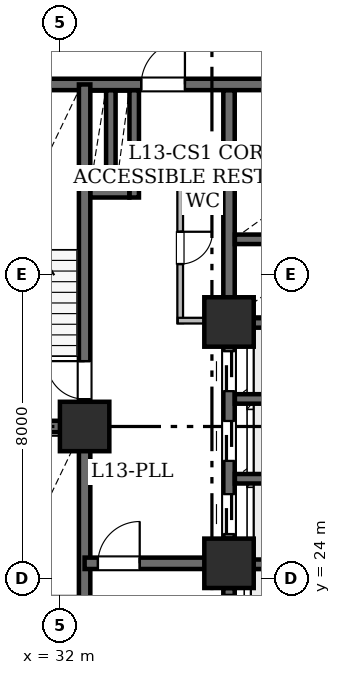
"""IFC4 building model, lengths in metres.
Left out: names, types, materials, properties, quantities, classifications, styles, units other than length and angle.
Written with IfcOpenShell. Run it as: python <this file> out.ifc"""

import sys

from ifc_helpers import new_model, si_unit, direction, frame, frame_2d, origin, origin_2d, place, context, subcontext, project, spatial, rectangle, hollow_rectangle, extrude, element, fill, save


model = new_model("IFC4")
c1 = context("Model", 3, precision=1e-05, world=origin(), true_north=direction((0.0, 1.0)))
c2 = subcontext(c1, "Body", "Model", "MODEL_VIEW")
j1 = project(units=[si_unit("LENGTHUNIT", "METRE"), si_unit("PLANEANGLEUNIT", "RADIAN")], contexts=[c1])
p1 = place(None, origin())
s1 = spatial("IfcSite", under=j1, at=p1, CompositionType="ELEMENT")
p2 = place(p1, origin())
s2 = spatial("IfcBuilding", under=s1, at=p2, CompositionType="ELEMENT")
p3 = place(p2, frame((0.0, 0.0, 55.2)))
s3 = spatial("IfcBuildingStorey", under=s2, at=p3, CompositionType="ELEMENT", Elevation=55.2)
for number, where, z_axis, x_axis in (
    (1, (32.65, 28.0, 0.0), (0.0, 0.0, 1.0), (1.0, 0.0, 0.0)),
    (2, (36.45, 24.4, 0.0), (0.0, 0.0, 1.0), (1.0, 0.0, 0.0)),
    (3, (36.45, 30.75, 0.0), (0.0, 0.0, 1.0), (1.0, 0.0, 0.0)),
):
    element("IfcColumn", number, at=place(p3, frame(where, z_axis=z_axis, x_axis=x_axis)), inside=s3, PredefinedType="COLUMN", context=c2, shape_type="SweptSolid", body=[
        extrude(hollow_rectangle(XDim=1.3, YDim=1.3, WallThickness=0.065, at=origin_2d()), origin(), (0.0, 0.0, 1.0), 3.65),
    ])
p4 = place(p3, frame((29.0, 37.0, 0.0), z_axis=(0.0, 0.0, 1.0), x_axis=(1.0, 0.0, 0.0)))
e4 = element("IfcWall", 4, at=p4, inside=s3, PredefinedType="SHEAR", context=c2, shape_type="SweptSolid", body=[
    extrude(rectangle(XDim=10.4, YDim=0.3, at=frame_2d((5.2, 0.0))), origin(), (0.0, 0.0, 1.0), 3.43),
])
p5 = place(p4, frame((5.14, 0.0, 0.0)))
e5 = element("IfcOpeningElement", 5, at=p5, cuts=e4, PredefinedType="OPENING", context=c2, shape_type="SweptSolid", body=[
    extrude(rectangle(XDim=1.15, YDim=2.2, at=frame_2d((0.575, 1.1))), frame((0.0, 0.16, 0.0), z_axis=(0.0, -1.0, 0.0), x_axis=(1.0, 0.0, 0.0)), (0.0, 0.0, 1.0), 0.32),
])
p6 = place(p3, frame((32.65, 19.0, 0.0), z_axis=(0.0, 0.0, 1.0), x_axis=(0.0, 1.0, 0.0)))
e6 = element("IfcWall", 6, at=p6, inside=s3, PredefinedType="SHEAR", context=c2, shape_type="SweptSolid", body=[
    extrude(rectangle(XDim=9.0, YDim=0.3, at=frame_2d((4.5, 0.0))), origin(), (0.0, 0.0, 1.0), 3.43),
])
p7 = place(p6, frame((0.72, 0.0, 0.0)))
e7 = element("IfcOpeningElement", 7, at=p7, cuts=e6, PredefinedType="OPENING", context=c2, shape_type="SweptSolid", body=[
    extrude(rectangle(XDim=1.0, YDim=2.15, at=frame_2d((0.5, 1.075))), frame((0.0, 0.16, 0.0), z_axis=(0.0, -1.0, 0.0), x_axis=(1.0, 0.0, 0.0)), (0.0, 0.0, 1.0), 0.32),
])
p8 = place(p3, frame((32.65, 28.0, 0.0), z_axis=(0.0, 0.0, 1.0), x_axis=(0.0, 1.0, 0.0)))
e8 = element("IfcWall", 8, at=p8, inside=s3, PredefinedType="SHEAR", context=c2, shape_type="SweptSolid", body=[
    extrude(rectangle(XDim=9.0, YDim=0.3, at=frame_2d((4.5, 0.0))), origin(), (0.0, 0.0, 1.0), 3.43),
])
p9 = place(p8, frame((0.72, 0.0, 0.0)))
e9 = element("IfcOpeningElement", 9, at=p9, cuts=e8, PredefinedType="OPENING", context=c2, shape_type="SweptSolid", body=[
    extrude(rectangle(XDim=1.0, YDim=2.15, at=frame_2d((0.5, 1.075))), frame((0.0, 0.16, 0.0), z_axis=(0.0, -1.0, 0.0), x_axis=(1.0, 0.0, 0.0)), (0.0, 0.0, 1.0), 0.32),
])
p10 = place(p3, frame((29.0, 28.0, 0.0), z_axis=(0.0, 0.0, 1.0), x_axis=(1.0, 0.0, 0.0)))
e10 = element("IfcWall", 10, at=p10, inside=s3, PredefinedType="SHEAR", context=c2, shape_type="SweptSolid", body=[
    extrude(rectangle(XDim=3.65, YDim=0.3, at=frame_2d((1.825, 0.0))), origin(), (0.0, 0.0, 1.0), 3.43),
])
p11 = place(p3, frame((32.65, 24.4, 0.0), z_axis=(0.0, 0.0, 1.0), x_axis=(1.0, 0.0, 0.0)))
e11 = element("IfcWall", 11, at=p11, inside=s3, PredefinedType="SHEAR", context=c2, shape_type="SweptSolid", body=[
    extrude(rectangle(XDim=3.8, YDim=0.3, at=frame_2d((1.9, 0.0))), origin(), (0.0, 0.0, 1.0), 3.43),
])
p12 = place(p11, frame((0.35, 0.0, 0.0)))
e12 = element("IfcOpeningElement", 12, at=p12, cuts=e11, PredefinedType="OPENING", context=c2, shape_type="SweptSolid", body=[
    extrude(rectangle(XDim=1.1, YDim=2.15, at=frame_2d((0.55, 1.075))), frame((0.0, 0.16, 0.0), z_axis=(0.0, -1.0, 0.0), x_axis=(1.0, 0.0, 0.0)), (0.0, 0.0, 1.0), 0.32),
])
p13 = place(p3, frame((36.45, 19.154, 0.0), z_axis=(0.0, 0.0, 1.0), x_axis=(0.0, 1.0, 0.0)))
e13 = element("IfcWall", 13, at=p13, inside=s3, PredefinedType="SHEAR", context=c2, shape_type="SweptSolid", body=[
    extrude(rectangle(XDim=4.596, YDim=0.3, at=frame_2d((2.298, 0.0))), origin(), (0.0, 0.0, 1.0), 3.43),
])
p14 = place(p13, frame((0.696, 0.0, 0.0)))
e14 = element("IfcOpeningElement", 14, at=p14, cuts=e13, PredefinedType="OPENING", context=c2, shape_type="SweptSolid", body=[
    extrude(rectangle(XDim=1.1, YDim=2.15, at=frame_2d((0.55, 1.075))), frame((0.0, 0.16, 0.0), z_axis=(0.0, -1.0, 0.0), x_axis=(1.0, 0.0, 0.0)), (0.0, 0.0, 1.0), 0.32),
])
p15 = place(p13, frame((3.316, 0.0, 0.0)))
e15 = element("IfcOpeningElement", 15, at=p15, cuts=e13, PredefinedType="OPENING", context=c2, shape_type="SweptSolid", body=[
    extrude(rectangle(XDim=1.1, YDim=2.15, at=frame_2d((0.55, 1.075))), frame((0.0, 0.16, 0.0), z_axis=(0.0, -1.0, 0.0), x_axis=(1.0, 0.0, 0.0)), (0.0, 0.0, 1.0), 0.32),
])
p16 = place(p3, frame((36.45, 25.05, 0.0), z_axis=(0.0, 0.0, 1.0), x_axis=(0.0, 1.0, 0.0)))
e16 = element("IfcWall", 16, at=p16, inside=s3, PredefinedType="SHEAR", context=c2, shape_type="SweptSolid", body=[
    extrude(rectangle(XDim=5.05, YDim=0.3, at=frame_2d((2.525, 0.0))), origin(), (0.0, 0.0, 1.0), 3.43),
])
p17 = place(p16, frame((0.12, 0.0, 0.0)))
e17 = element("IfcOpeningElement", 17, at=p17, cuts=e16, PredefinedType="OPENING", context=c2, shape_type="SweptSolid", body=[
    extrude(rectangle(XDim=1.05, YDim=2.15, at=frame_2d((0.525, 1.075))), frame((0.0, 0.16, 0.0), z_axis=(0.0, -1.0, 0.0), x_axis=(1.0, 0.0, 0.0)), (0.0, 0.0, 1.0), 0.32),
])
p18 = place(p16, frame((2.045, 0.0, 0.0)))
e18 = element("IfcOpeningElement", 18, at=p18, cuts=e16, PredefinedType="OPENING", context=c2, shape_type="SweptSolid", body=[
    extrude(rectangle(XDim=1.05, YDim=2.15, at=frame_2d((0.525, 1.075))), frame((0.0, 0.16, 0.0), z_axis=(0.0, -1.0, 0.0), x_axis=(1.0, 0.0, 0.0)), (0.0, 0.0, 1.0), 0.32),
])
p19 = place(p16, frame((3.88, 0.0, 0.0)))
e19 = element("IfcOpeningElement", 19, at=p19, cuts=e16, PredefinedType="OPENING", context=c2, shape_type="SweptSolid", body=[
    extrude(rectangle(XDim=1.05, YDim=2.15, at=frame_2d((0.525, 1.075))), frame((0.0, 0.16, 0.0), z_axis=(0.0, -1.0, 0.0), x_axis=(1.0, 0.0, 0.0)), (0.0, 0.0, 1.0), 0.32),
])
p20 = place(p3, frame((36.45, 31.4, 0.0), z_axis=(0.0, 0.0, 1.0), x_axis=(0.0, 1.0, 0.0)))
e20 = element("IfcWall", 20, at=p20, inside=s3, PredefinedType="SHEAR", context=c2, shape_type="SweptSolid", body=[
    extrude(rectangle(XDim=5.446, YDim=0.3, at=frame_2d((2.723, 0.0))), origin(), (0.0, 0.0, 1.0), 3.43),
])
for number, where, z_axis, x_axis in (
    (21, (36.604, 24.375, 0.0), (0.0, 0.0, 1.0), (1.0, 0.0, 0.0)),
    (22, (36.604, 26.625, 0.0), (0.0, 0.0, 1.0), (1.0, 0.0, 0.0)),
    (23, (36.604, 28.725, 0.0), (0.0, 0.0, 1.0), (1.0, 0.0, 0.0)),
    (24, (36.604, 30.725, 0.0), (0.0, 0.0, 1.0), (1.0, 0.0, 0.0)),
    (25, (36.604, 32.925, 0.0), (0.0, 0.0, 1.0), (1.0, 0.0, 0.0)),
    (26, (36.604, 34.975, 0.0), (0.0, 0.0, 1.0), (1.0, 0.0, 0.0)),
):
    element("IfcWall", number, at=place(p3, frame(where, z_axis=z_axis, x_axis=x_axis)), inside=s3, PredefinedType="SHEAR", context=c2, shape_type="SweptSolid", body=[
        extrude(rectangle(XDim=2.642, YDim=0.25, at=frame_2d((1.321, 0.0))), origin(), (0.0, 0.0, 1.0), 3.43),
    ])
p21 = place(p3, frame((33.955, 34.025, 0.0), z_axis=(0.0, 0.0, 1.0), x_axis=(0.0, 1.0, 0.0)))
e27 = element("IfcWall", 27, at=p21, inside=s3, PredefinedType="SHEAR", context=c2, shape_type="SweptSolid", body=[
    extrude(rectangle(XDim=2.821, YDim=0.25, at=frame_2d((1.411, 0.0))), origin(), (0.0, 0.0, 1.0), 3.43),
])
p22 = place(p3, frame((32.804, 34.15, 0.0), z_axis=(0.0, 0.0, 1.0), x_axis=(1.0, 0.0, 0.0)))
e28 = element("IfcWall", 28, at=p22, inside=s3, PredefinedType="SHEAR", context=c2, shape_type="SweptSolid", body=[
    extrude(rectangle(XDim=1.022, YDim=0.25, at=frame_2d((0.511, 0.0))), origin(), (0.0, 0.0, 1.0), 3.43),
])
p23 = place(p3, frame((33.34, 34.279, 0.0), z_axis=(0.0, 0.0, 1.0), x_axis=(0.0, 1.0, 0.0)))
e29 = element("IfcWall", 29, at=p23, inside=s3, PredefinedType="SHEAR", context=c2, shape_type="SweptSolid", body=[
    extrude(rectangle(XDim=2.567, YDim=0.25, at=frame_2d((1.283, 0.0))), origin(), (0.0, 0.0, 1.0), 3.43),
])
p24 = place(p3, frame((36.306, 34.615, 0.0), z_axis=(0.0, 0.0, 1.0), x_axis=(-1.0, 0.0, 0.0)))
e30 = element("IfcWall", 30, at=p24, inside=s3, PredefinedType="STANDARD", context=c2, shape_type="SweptSolid", body=[
    extrude(rectangle(XDim=1.206, YDim=0.15, at=frame_2d((0.603, 0.0))), origin(), (0.0, 0.0, 1.0), 3.43),
])
p25 = place(p3, frame((35.165, 34.678, 0.0), z_axis=(0.0, 0.0, 1.0), x_axis=(0.0, -1.0, 0.0)))
e31 = element("IfcWall", 31, at=p25, inside=s3, PredefinedType="STANDARD", context=c2, shape_type="SweptSolid", body=[
    extrude(rectangle(XDim=3.958, YDim=0.15, at=frame_2d((1.979, 0.0))), origin(), (0.0, 0.0, 1.0), 3.43),
])
p26 = place(p25, frame((1.554, 0.0, 0.0)))
e32 = element("IfcOpeningElement", 32, at=p26, cuts=e31, PredefinedType="OPENING", context=c2, shape_type="SweptSolid", body=[
    extrude(rectangle(XDim=0.85, YDim=2.1, at=frame_2d((0.425, 1.05))), frame((0.0, 0.085, 0.0), z_axis=(0.0, -1.0, 0.0), x_axis=(1.0, 0.0, 0.0)), (0.0, 0.0, 1.0), 0.17),
])
p27 = place(p3, frame((35.102, 30.785, 0.0), z_axis=(0.0, 0.0, 1.0), x_axis=(1.0, 0.0, 0.0)))
e33 = element("IfcWall", 33, at=p27, inside=s3, PredefinedType="STANDARD", context=c2, shape_type="SweptSolid", body=[
    extrude(rectangle(XDim=1.198, YDim=0.15, at=frame_2d((0.599, 0.0))), origin(), (0.0, 0.0, 1.0), 3.43),
])
p28 = place(p9, origin())
e34 = element("IfcDoor", 34, at=p28, inside=s3, OperationType="SINGLE_SWING_RIGHT", PredefinedType="DOOR", context=c2, shape_type="SweptSolid", body=[
    extrude(rectangle(XDim=1.0, YDim=2.15, at=frame_2d((0.5, 1.075))), frame((0.0, 0.025, 0.0), z_axis=(0.0, -1.0, 0.0), x_axis=(1.0, 0.0, 0.0)), (0.0, 0.0, 1.0), 0.05),
])
fill(e9, e34)
p29 = place(p12, origin())
e35 = element("IfcDoor", 35, at=p29, inside=s3, OperationType="SINGLE_SWING_RIGHT", PredefinedType="DOOR", context=c2, shape_type="SweptSolid", body=[
    extrude(rectangle(XDim=1.1, YDim=2.15, at=frame_2d((0.55, 1.075))), frame((0.0, 0.025, 0.0), z_axis=(0.0, -1.0, 0.0), x_axis=(1.0, 0.0, 0.0)), (0.0, 0.0, 1.0), 0.05),
])
fill(e12, e35)
p30 = place(p5, origin())
e36 = element("IfcDoor", 36, at=p30, inside=s3, OperationType="SINGLE_SWING_RIGHT", PredefinedType="DOOR", context=c2, shape_type="SweptSolid", body=[
    extrude(rectangle(XDim=1.15, YDim=2.2, at=frame_2d((0.575, 1.1))), frame((0.0, 0.025, 0.0), z_axis=(0.0, -1.0, 0.0), x_axis=(1.0, 0.0, 0.0)), (0.0, 0.0, 1.0), 0.05),
])
fill(e5, e36)
p31 = place(p15, origin())
e37 = element("IfcDoor", 37, at=p31, inside=s3, OperationType="SLIDING_TO_LEFT", PredefinedType="DOOR", context=c2, shape_type="SweptSolid", body=[
    extrude(rectangle(XDim=1.1, YDim=2.15, at=frame_2d((0.55, 1.075))), frame((0.0, 0.025, 0.0), z_axis=(0.0, -1.0, 0.0), x_axis=(1.0, 0.0, 0.0)), (0.0, 0.0, 1.0), 0.05),
])
fill(e15, e37)
p32 = place(p17, origin())
e38 = element("IfcDoor", 38, at=p32, inside=s3, OperationType="SLIDING_TO_LEFT", PredefinedType="DOOR", context=c2, shape_type="SweptSolid", body=[
    extrude(rectangle(XDim=1.05, YDim=2.15, at=frame_2d((0.525, 1.075))), frame((0.0, 0.025, 0.0), z_axis=(0.0, -1.0, 0.0), x_axis=(1.0, 0.0, 0.0)), (0.0, 0.0, 1.0), 0.05),
])
fill(e17, e38)
p33 = place(p18, origin())
e39 = element("IfcDoor", 39, at=p33, inside=s3, OperationType="SLIDING_TO_LEFT", PredefinedType="DOOR", context=c2, shape_type="SweptSolid", body=[
    extrude(rectangle(XDim=1.05, YDim=2.15, at=frame_2d((0.525, 1.075))), frame((0.0, 0.025, 0.0), z_axis=(0.0, -1.0, 0.0), x_axis=(1.0, 0.0, 0.0)), (0.0, 0.0, 1.0), 0.05),
])
fill(e18, e39)
p34 = place(p19, origin())
e40 = element("IfcDoor", 40, at=p34, inside=s3, OperationType="SLIDING_TO_LEFT", PredefinedType="DOOR", context=c2, shape_type="SweptSolid", body=[
    extrude(rectangle(XDim=1.05, YDim=2.15, at=frame_2d((0.525, 1.075))), frame((0.0, 0.025, 0.0), z_axis=(0.0, -1.0, 0.0), x_axis=(1.0, 0.0, 0.0)), (0.0, 0.0, 1.0), 0.05),
])
fill(e19, e40)
p35 = place(p26, origin())
e41 = element("IfcDoor", 41, at=p35, inside=s3, OperationType="SINGLE_SWING_LEFT", PredefinedType="DOOR", context=c2, shape_type="SweptSolid", body=[
    extrude(rectangle(XDim=0.85, YDim=2.1, at=frame_2d((0.425, 1.05))), frame((0.0, 0.025, 0.0), z_axis=(0.0, -1.0, 0.0), x_axis=(1.0, 0.0, 0.0)), (0.0, 0.0, 1.0), 0.05),
])
fill(e32, e41)
save(model, sys.argv[1])
